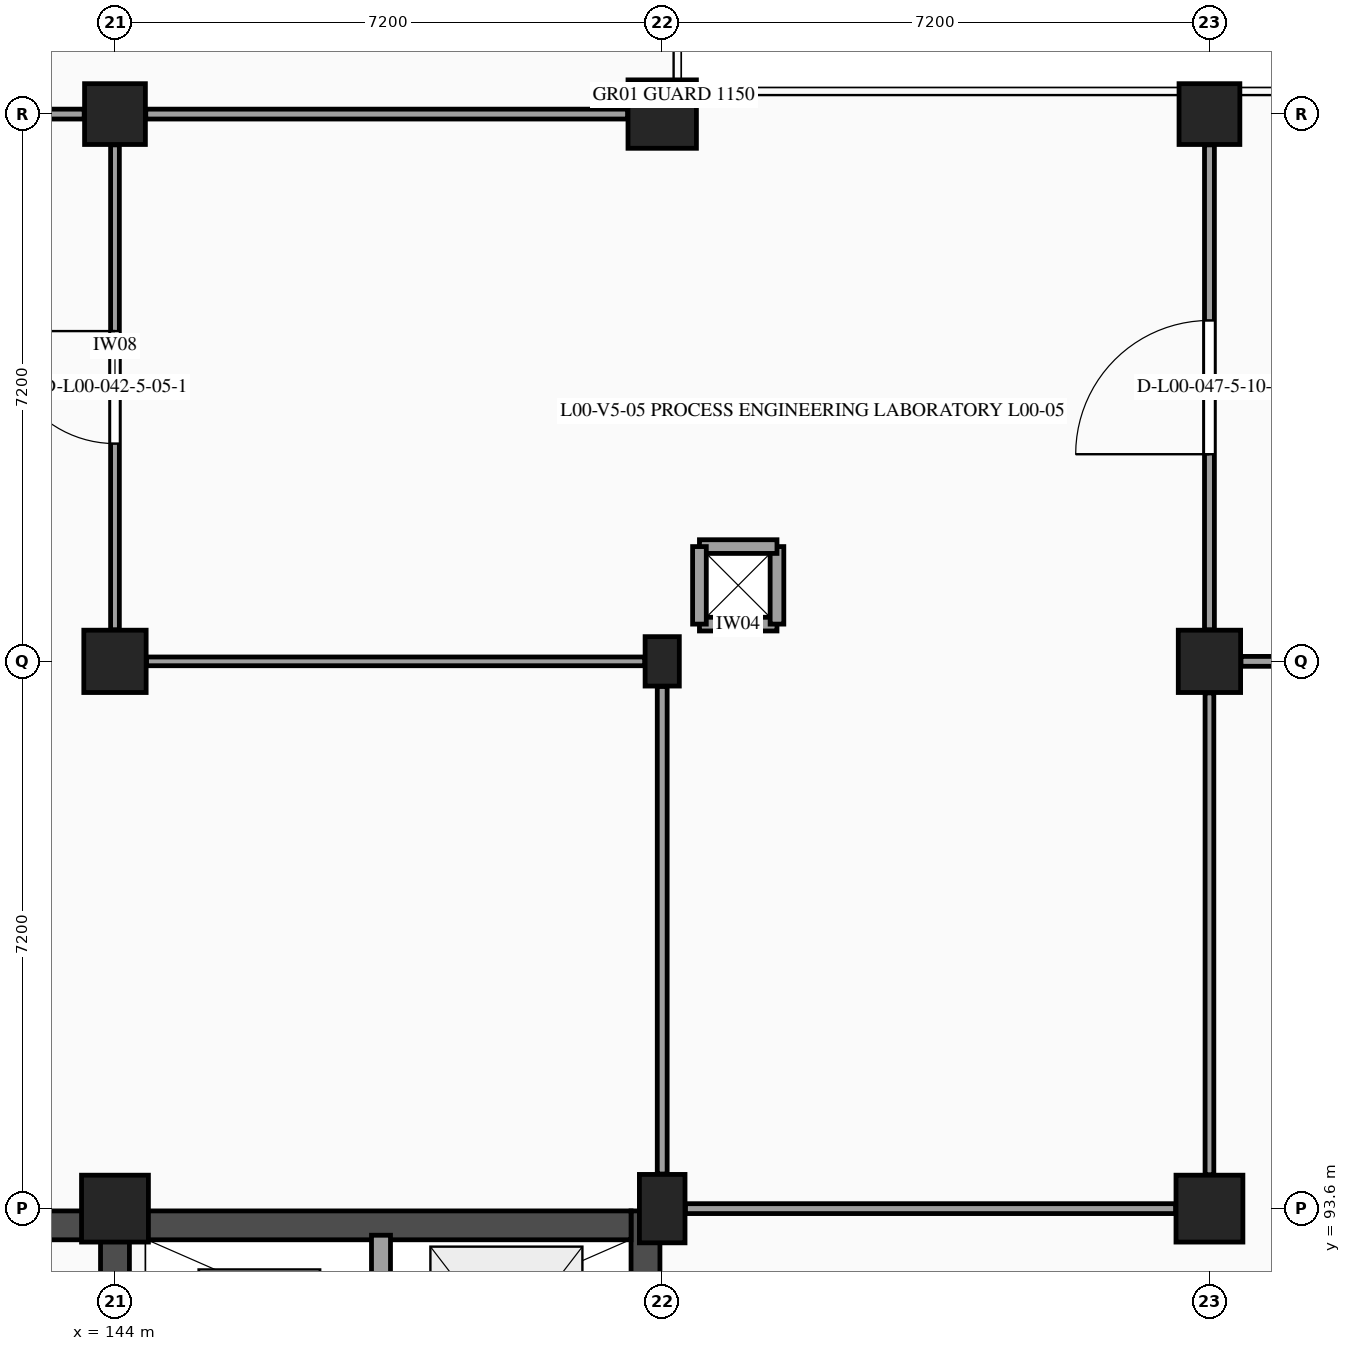
"""IFC4 building model, lengths in metres.
Left out: names, types, materials, properties, quantities, classifications, styles, units other than length and angle.
Written with IfcOpenShell. Run it as: python <this file> out.ifc"""

import sys

from ifc_helpers import new_model, si_unit, direction, frame, frame_2d, origin, origin_2d, place, context, subcontext, project, spatial, rectangle, extrude, element, fill, save


model = new_model("IFC4")
c1 = context("Model", 3, precision=1e-05, world=origin(), true_north=direction((0.0, 1.0)))
c2 = subcontext(c1, "Body", "Model", "MODEL_VIEW")
j1 = project(units=[si_unit("LENGTHUNIT", "METRE"), si_unit("PLANEANGLEUNIT", "RADIAN")], contexts=[c1])
p1 = place(None, origin())
s1 = spatial("IfcSite", under=j1, at=p1, CompositionType="ELEMENT")
p2 = place(p1, origin())
s2 = spatial("IfcBuilding", under=s1, at=p2, CompositionType="ELEMENT")
p3 = place(p2, origin())
s3 = spatial("IfcBuildingStorey", under=s2, at=p3, CompositionType="ELEMENT", Elevation=0.0)
p4 = place(p3, frame((144.0, 93.6, 0.0), z_axis=(0.0, 0.0, 1.0), x_axis=(1.0, 0.0, 0.0)))
e1 = element("IfcColumn", 1, at=p4, inside=s3, PredefinedType="COLUMN", context=c2, shape_type="SweptSolid", body=[
    extrude(rectangle(XDim=0.88, YDim=0.88, at=origin_2d()), origin(), (0.0, 0.0, 1.0), 5.4),
])
p5 = place(p3, frame((144.0, 100.8, 0.0), z_axis=(0.0, 0.0, 1.0), x_axis=(1.0, 0.0, 0.0)))
e2 = element("IfcColumn", 2, at=p5, inside=s3, PredefinedType="COLUMN", context=c2, shape_type="SweptSolid", body=[
    extrude(rectangle(XDim=0.82, YDim=0.82, at=origin_2d()), origin(), (0.0, 0.0, 1.0), 5.4),
])
p6 = place(p3, frame((144.0, 108.0, 0.0), z_axis=(0.0, 0.0, 1.0), x_axis=(1.0, 0.0, 0.0)))
e3 = element("IfcColumn", 3, at=p6, inside=s3, PredefinedType="COLUMN", context=c2, shape_type="SweptSolid", body=[
    extrude(rectangle(XDim=0.8, YDim=0.8, at=origin_2d()), origin(), (0.0, 0.0, 1.0), 5.4),
])
p7 = place(p3, frame((151.2, 93.6, 0.0), z_axis=(0.0, 0.0, 1.0), x_axis=(1.0, 0.0, 0.0)))
e4 = element("IfcColumn", 4, at=p7, inside=s3, PredefinedType="COLUMN", context=c2, shape_type="SweptSolid", body=[
    extrude(rectangle(XDim=0.6, YDim=0.9, at=origin_2d()), origin(), (0.0, 0.0, 1.0), 5.4),
])
p8 = place(p3, frame((151.2, 100.8, 0.0), z_axis=(0.0, 0.0, 1.0), x_axis=(1.0, 0.0, 0.0)))
e5 = element("IfcColumn", 5, at=p8, inside=s3, PredefinedType="PILASTER", context=c2, shape_type="SweptSolid", body=[
    extrude(rectangle(XDim=0.45, YDim=0.65, at=origin_2d()), origin(), (0.0, 0.0, 1.0), 5.4),
])
p9 = place(p3, frame((151.2, 108.0, 0.0), z_axis=(0.0, 0.0, 1.0), x_axis=(1.0, 0.0, 0.0)))
e6 = element("IfcColumn", 6, at=p9, inside=s3, PredefinedType="COLUMN", context=c2, shape_type="SweptSolid", body=[
    extrude(rectangle(XDim=0.9, YDim=0.9, at=origin_2d()), origin(), (0.0, 0.0, 1.0), 5.4),
])
p10 = place(p3, frame((158.4, 93.6, 0.0), z_axis=(0.0, 0.0, 1.0), x_axis=(1.0, 0.0, 0.0)))
e7 = element("IfcColumn", 7, at=p10, inside=s3, PredefinedType="COLUMN", context=c2, shape_type="SweptSolid", body=[
    extrude(rectangle(XDim=0.88, YDim=0.88, at=origin_2d()), origin(), (0.0, 0.0, 1.0), 5.4),
])
p11 = place(p3, frame((158.4, 100.8, 0.0), z_axis=(0.0, 0.0, 1.0), x_axis=(1.0, 0.0, 0.0)))
e8 = element("IfcColumn", 8, at=p11, inside=s3, PredefinedType="COLUMN", context=c2, shape_type="SweptSolid", body=[
    extrude(rectangle(XDim=0.82, YDim=0.82, at=origin_2d()), origin(), (0.0, 0.0, 1.0), 5.4),
])
p12 = place(p3, frame((158.4, 108.0, 0.0), z_axis=(0.0, 0.0, 1.0), x_axis=(1.0, 0.0, 0.0)))
e9 = element("IfcColumn", 9, at=p12, inside=s3, PredefinedType="COLUMN", context=c2, shape_type="SweptSolid", body=[
    extrude(rectangle(XDim=0.8, YDim=0.8, at=origin_2d()), origin(), (0.0, 0.0, 1.0), 5.4),
])
p13 = place(p3, frame((137.21, 93.38, 0.0), z_axis=(0.0, 0.0, 1.0), x_axis=(1.0, 0.0, 0.0)))
e10 = element("IfcWall", 10, at=p13, inside=s3, PredefinedType="SHEAR", context=c2, shape_type="SweptSolid", body=[
    extrude(rectangle(XDim=6.6, YDim=0.38, at=frame_2d((3.3, 0.0))), origin(), (0.0, 0.0, 1.0), 5.09),
])
p14 = place(p13, frame((1.42, 0.0, 0.0)))
e11 = element("IfcOpeningElement", 11, at=p14, cuts=e10, PredefinedType="OPENING", context=c2, shape_type="SweptSolid", body=[
    extrude(rectangle(XDim=0.85, YDim=2.1, at=frame_2d((0.425, 1.05))), frame((0.0, 0.2, 0.0), z_axis=(0.0, -1.0, 0.0), x_axis=(1.0, 0.0, 0.0)), (0.0, 0.0, 1.0), 0.4),
])
p15 = place(p13, frame((3.4, 0.0, 0.0)))
e12 = element("IfcOpeningElement", 12, at=p15, cuts=e10, PredefinedType="OPENING", context=c2, shape_type="SweptSolid", body=[
    extrude(rectangle(XDim=0.95, YDim=2.15, at=frame_2d((0.475, 1.075))), frame((0.0, 0.2, 0.0), z_axis=(0.0, -1.0, 0.0), x_axis=(1.0, 0.0, 0.0)), (0.0, 0.0, 1.0), 0.4),
])
p16 = place(p3, frame((144.0, 86.43, 0.0), z_axis=(0.0, 0.0, 1.0), x_axis=(0.0, 1.0, 0.0)))
e13 = element("IfcWall", 13, at=p16, inside=s3, PredefinedType="SHEAR", context=c2, shape_type="SweptSolid", body=[
    extrude(rectangle(XDim=7.14, YDim=0.38, at=frame_2d((3.57, 0.0))), origin(), (0.0, 0.0, 1.0), 5.09),
])
p17 = place(p16, frame((1.4, 0.0, 0.0)))
e14 = element("IfcOpeningElement", 14, at=p17, cuts=e13, PredefinedType="OPENING", context=c2, shape_type="SweptSolid", body=[
    extrude(rectangle(XDim=1.8, YDim=2.2, at=frame_2d((0.9, 1.1))), frame((0.0, 0.2, 0.0), z_axis=(0.0, -1.0, 0.0), x_axis=(1.0, 0.0, 0.0)), (0.0, 0.0, 1.0), 0.4),
])
p18 = place(p3, frame((150.98, 86.43, 0.0), z_axis=(0.0, 0.0, 1.0), x_axis=(0.0, 1.0, 0.0)))
e15 = element("IfcWall", 15, at=p18, inside=s3, PredefinedType="SHEAR", context=c2, shape_type="SweptSolid", body=[
    extrude(rectangle(XDim=7.14, YDim=0.38, at=frame_2d((3.57, 0.0))), origin(), (0.0, 0.0, 1.0), 5.09),
])
p19 = place(p3, frame((144.19, 93.38, 0.0), z_axis=(0.0, 0.0, 1.0), x_axis=(1.0, 0.0, 0.0)))
e16 = element("IfcWall", 16, at=p19, inside=s3, PredefinedType="SHEAR", context=c2, shape_type="SweptSolid", body=[
    extrude(rectangle(XDim=6.6, YDim=0.38, at=frame_2d((3.3, 0.0))), origin(), (0.0, 0.0, 1.0), 5.09),
])
p20 = place(p3, frame((147.5, 90.38, 0.0), z_axis=(0.0, 0.0, 1.0), x_axis=(0.0, 1.0, 0.0)))
e17 = element("IfcWall", 17, at=p20, inside=s3, PredefinedType="PARTITIONING", context=c2, shape_type="SweptSolid", body=[
    extrude(rectangle(XDim=2.87, YDim=0.25, at=frame_2d((1.435, 0.0))), origin(), (0.0, 0.0, 1.0), 5.09),
])
for number, where, z_axis, x_axis in (
    (18, (151.69, 101.29, 0.0), (0.0, 0.0, 1.0), (1.0, 0.0, 0.0)),
    (19, (152.71, 101.29, 0.0), (0.0, 0.0, 1.0), (0.0, 1.0, 0.0)),
    (20, (152.71, 102.31, 0.0), (0.0, 0.0, 1.0), (-1.0, 0.0, 0.0)),
    (21, (151.69, 102.31, 0.0), (0.0, 0.0, 1.0), (0.0, -1.0, 0.0)),
):
    element("IfcWall", number, at=place(p3, frame(where, z_axis=z_axis, x_axis=x_axis)), inside=s3, PredefinedType="PARTITIONING", context=c2, shape_type="SweptSolid", body=[
        extrude(rectangle(XDim=1.02, YDim=0.18, at=frame_2d((0.51, 0.0))), origin(), (0.0, 0.0, 1.0), 5.09),
    ])
p21 = place(p3, frame((144.0, 101.215, 0.0), z_axis=(0.0, 0.0, 1.0), x_axis=(0.0, 1.0, 0.0)))
e22 = element("IfcWall", 22, at=p21, inside=s3, PredefinedType="PARTITIONING", context=c2, shape_type="SweptSolid", body=[
    extrude(rectangle(XDim=6.38, YDim=0.115, at=frame_2d((3.19, 0.0))), origin(), (0.0, 0.0, 1.0), 4.455),
])
p22 = place(p21, frame((2.45, 0.0, 0.0)))
e23 = element("IfcOpeningElement", 23, at=p22, cuts=e22, PredefinedType="OPENING", context=c2, shape_type="SweptSolid", body=[
    extrude(rectangle(XDim=1.48, YDim=2.28, at=frame_2d((0.74, 1.14))), frame((0.0, 0.067, 0.0), z_axis=(0.0, -1.0, 0.0), x_axis=(1.0, 0.0, 0.0)), (0.0, 0.0, 1.0), 0.135),
])
p23 = place(p3, frame((137.255, 108.0, 0.0), z_axis=(0.0, 0.0, 1.0), x_axis=(1.0, 0.0, 0.0)))
e24 = element("IfcWall", 24, at=p23, inside=s3, PredefinedType="PARTITIONING", context=c2, shape_type="SweptSolid", body=[
    extrude(rectangle(XDim=6.34, YDim=0.13, at=frame_2d((3.17, 0.0))), origin(), (0.0, 0.0, 1.0), 4.29),
])
p24 = place(p3, frame((151.2, 94.055, 0.0), z_axis=(0.0, 0.0, 1.0), x_axis=(0.0, 1.0, 0.0)))
e25 = element("IfcWall", 25, at=p24, inside=s3, PredefinedType="PARTITIONING", context=c2, shape_type="SweptSolid", body=[
    extrude(rectangle(XDim=6.415, YDim=0.13, at=frame_2d((3.208, 0.0))), origin(), (0.0, 0.0, 1.0), 4.46),
])
p25 = place(p3, frame((144.415, 100.8, 0.0), z_axis=(0.0, 0.0, 1.0), x_axis=(1.0, 0.0, 0.0)))
e26 = element("IfcWall", 26, at=p25, inside=s3, PredefinedType="PARTITIONING", context=c2, shape_type="SweptSolid", body=[
    extrude(rectangle(XDim=6.555, YDim=0.115, at=frame_2d((3.277, 0.0))), origin(), (0.0, 0.0, 1.0), 4.31),
])
p26 = place(p3, frame((144.405, 108.0, 0.0), z_axis=(0.0, 0.0, 1.0), x_axis=(1.0, 0.0, 0.0)))
e27 = element("IfcWall", 27, at=p26, inside=s3, PredefinedType="PARTITIONING", context=c2, shape_type="SweptSolid", body=[
    extrude(rectangle(XDim=6.34, YDim=0.13, at=frame_2d((3.17, 0.0))), origin(), (0.0, 0.0, 1.0), 4.31),
])
p27 = place(p3, frame((151.505, 93.6, 0.0), z_axis=(0.0, 0.0, 1.0), x_axis=(1.0, 0.0, 0.0)))
e28 = element("IfcWall", 28, at=p27, inside=s3, PredefinedType="PARTITIONING", context=c2, shape_type="SweptSolid", body=[
    extrude(rectangle(XDim=6.45, YDim=0.13, at=frame_2d((3.225, 0.0))), origin(), (0.0, 0.0, 1.0), 4.34),
])
p28 = place(p3, frame((158.4, 94.045, 0.0), z_axis=(0.0, 0.0, 1.0), x_axis=(0.0, 1.0, 0.0)))
e29 = element("IfcWall", 29, at=p28, inside=s3, PredefinedType="PARTITIONING", context=c2, shape_type="SweptSolid", body=[
    extrude(rectangle(XDim=6.34, YDim=0.115, at=frame_2d((3.17, 0.0))), origin(), (0.0, 0.0, 1.0), 4.46),
])
p29 = place(p3, frame((158.4, 101.215, 0.0), z_axis=(0.0, 0.0, 1.0), x_axis=(0.0, 1.0, 0.0)))
e30 = element("IfcWall", 30, at=p29, inside=s3, PredefinedType="PARTITIONING", context=c2, shape_type="SweptSolid", body=[
    extrude(rectangle(XDim=6.38, YDim=0.13, at=frame_2d((3.19, 0.0))), origin(), (0.0, 0.0, 1.0), 4.455),
])
p30 = place(p29, frame((2.31, 0.0, 0.0)))
e31 = element("IfcOpeningElement", 31, at=p30, cuts=e30, PredefinedType="OPENING", context=c2, shape_type="SweptSolid", body=[
    extrude(rectangle(XDim=1.76, YDim=2.3, at=frame_2d((0.88, 1.15))), frame((0.0, 0.075, 0.0), z_axis=(0.0, -1.0, 0.0), x_axis=(1.0, 0.0, 0.0)), (0.0, 0.0, 1.0), 0.15),
])
p31 = place(p3, frame((158.815, 100.8, 0.0), z_axis=(0.0, 0.0, 1.0), x_axis=(1.0, 0.0, 0.0)))
e32 = element("IfcWall", 32, at=p31, inside=s3, PredefinedType="PARTITIONING", context=c2, shape_type="SweptSolid", body=[
    extrude(rectangle(XDim=6.555, YDim=0.13, at=frame_2d((3.278, 0.0))), origin(), (0.0, 0.0, 1.0), 4.35),
])
p32 = place(p22, origin())
e33 = element("IfcDoor", 33, at=p32, inside=s3, OperationType="SINGLE_SWING_RIGHT", PredefinedType="DOOR", context=c2, shape_type="SweptSolid", body=[
    extrude(rectangle(XDim=1.48, YDim=2.28, at=frame_2d((0.74, 1.14))), frame((0.0, 0.025, 0.0), z_axis=(0.0, -1.0, 0.0), x_axis=(1.0, 0.0, 0.0)), (0.0, 0.0, 1.0), 0.05),
])
fill(e23, e33)
p33 = place(p30, origin())
e34 = element("IfcDoor", 34, at=p33, inside=s3, OperationType="SINGLE_SWING_LEFT", PredefinedType="DOOR", context=c2, shape_type="SweptSolid", body=[
    extrude(rectangle(XDim=1.76, YDim=2.3, at=frame_2d((0.88, 1.15))), frame((0.0, 0.025, 0.0), z_axis=(0.0, -1.0, 0.0), x_axis=(1.0, 0.0, 0.0)), (0.0, 0.0, 1.0), 0.05),
])
fill(e31, e34)
save(model, sys.argv[1])
